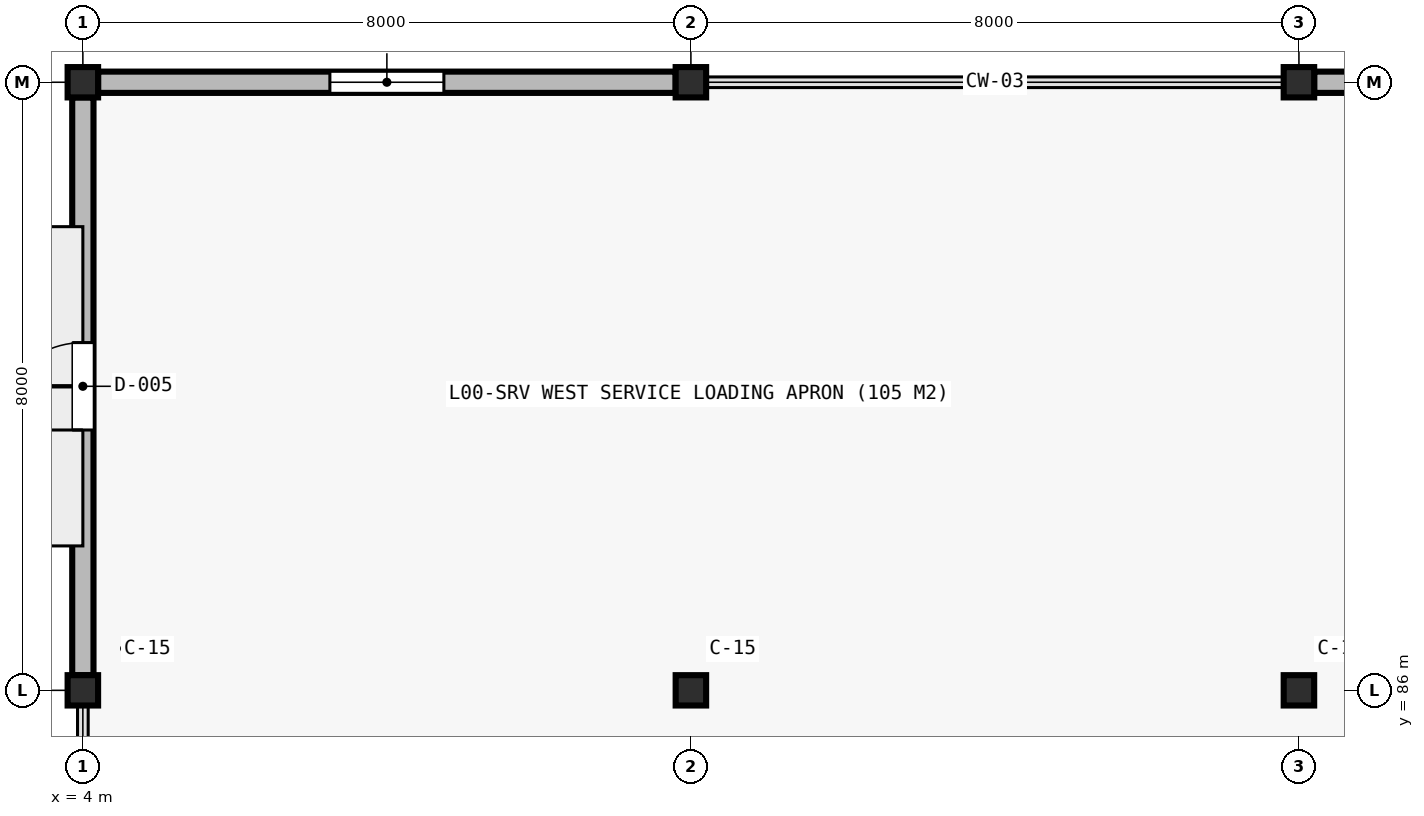
"""IFC4 building model, lengths in metres.
Left out: names, types, materials, properties, quantities, classifications, styles, units other than length and angle.
Written with IfcOpenShell. Run it as: python <this file> out.ifc"""

import sys

from ifc_helpers import new_model, si_unit, direction, frame, frame_2d, origin, origin_2d, place, context, subcontext, project, spatial, rectangle, i_section, extrude, element, fill, save


model = new_model("IFC4")
c1 = context("Model", 3, precision=1e-05, world=origin(), true_north=direction((0.0, 1.0)))
c2 = subcontext(c1, "Body", "Model", "MODEL_VIEW")
j1 = project(units=[si_unit("LENGTHUNIT", "METRE"), si_unit("PLANEANGLEUNIT", "RADIAN")], contexts=[c1])
p1 = place(None, origin())
s1 = spatial("IfcSite", under=j1, at=p1, CompositionType="ELEMENT")
p2 = place(p1, origin())
s2 = spatial("IfcBuilding", under=s1, at=p2, CompositionType="ELEMENT")
p3 = place(p2, origin())
s3 = spatial("IfcBuildingStorey", under=s2, at=p3, CompositionType="ELEMENT", Elevation=0.0)
for number, where, z_axis, x_axis in (
    (1, (4.0, 86.0, 0.0), (0.0, 0.0, 1.0), (1.0, 0.0, 0.0)),
    (2, (4.0, 94.0, 0.0), (0.0, 0.0, 1.0), (1.0, 0.0, 0.0)),
    (3, (12.0, 86.0, 0.0), (0.0, 0.0, 1.0), (1.0, 0.0, 0.0)),
    (4, (12.0, 94.0, 0.0), (0.0, 0.0, 1.0), (1.0, 0.0, 0.0)),
    (5, (20.0, 86.0, 0.0), (0.0, 0.0, 1.0), (1.0, 0.0, 0.0)),
    (6, (20.0, 94.0, 0.0), (0.0, 0.0, 1.0), (1.0, 0.0, 0.0)),
):
    element("IfcColumn", number, at=place(p3, frame(where, z_axis=z_axis, x_axis=x_axis)), inside=s3, PredefinedType="COLUMN", context=c2, shape_type="SweptSolid", body=[
        extrude(i_section(OverallWidth=0.401, OverallDepth=0.399, WebThickness=0.025, FlangeThickness=0.04, at=origin_2d()), origin(), (0.0, 0.0, 1.0), 6.02),
    ])
p4 = place(p3, frame((4.0, 86.199, 0.0), z_axis=(0.0, 0.0, 1.0), x_axis=(0.0, 1.0, 0.0)))
e7 = element("IfcWall", 7, at=p4, inside=s3, PredefinedType="STANDARD", context=c2, shape_type="SweptSolid", body=[
    extrude(rectangle(XDim=7.601, YDim=0.28, at=frame_2d((3.801, 0.0))), origin(), (0.0, 0.0, 1.0), 5.408),
])
p5 = place(p4, frame((3.226, 0.0, 0.0)))
e8 = element("IfcOpeningElement", 8, at=p5, cuts=e7, PredefinedType="OPENING", context=c2, shape_type="SweptSolid", body=[
    extrude(rectangle(XDim=1.15, YDim=2.2, at=frame_2d((0.575, 1.1))), frame((0.0, 0.15, 0.0), z_axis=(0.0, -1.0, 0.0), x_axis=(1.0, 0.0, 0.0)), (0.0, 0.0, 1.0), 0.3),
])
p6 = place(p3, frame((4.2, 94.0, 0.0), z_axis=(0.0, 0.0, 1.0), x_axis=(1.0, 0.0, 0.0)))
e9 = element("IfcWall", 9, at=p6, inside=s3, PredefinedType="STANDARD", context=c2, shape_type="SweptSolid", body=[
    extrude(rectangle(XDim=7.599, YDim=0.28, at=frame_2d((3.8, 0.0))), origin(), (0.0, 0.0, 1.0), 4.92),
])
p7 = place(p6, frame((3.05, 0.0, 0.95)))
e10 = element("IfcOpeningElement", 10, at=p7, cuts=e9, PredefinedType="OPENING", context=c2, shape_type="SweptSolid", body=[
    extrude(rectangle(XDim=1.5, YDim=2.0, at=frame_2d((0.75, 1.0))), frame((0.0, 0.15, 0.0), z_axis=(0.0, -1.0, 0.0), x_axis=(1.0, 0.0, 0.0)), (0.0, 0.0, 1.0), 0.3),
])
p8 = place(p3, frame((20.2, 94.0, 0.0), z_axis=(0.0, 0.0, 1.0), x_axis=(1.0, 0.0, 0.0)))
e11 = element("IfcWall", 11, at=p8, inside=s3, PredefinedType="STANDARD", context=c2, shape_type="SweptSolid", body=[
    extrude(rectangle(XDim=7.599, YDim=0.28, at=frame_2d((3.8, 0.0))), origin(), (0.0, 0.0, 1.0), 4.92),
])
p9 = place(p8, frame((2.774, 0.0, 0.0)))
e12 = element("IfcOpeningElement", 12, at=p9, cuts=e11, PredefinedType="OPENING", context=c2, shape_type="SweptSolid", body=[
    extrude(rectangle(XDim=2.05, YDim=2.25, at=frame_2d((1.025, 1.125))), frame((0.0, 0.15, 0.0), z_axis=(0.0, -1.0, 0.0), x_axis=(1.0, 0.0, 0.0)), (0.0, 0.0, 1.0), 0.3),
])
p10 = place(p5, origin())
e13 = element("IfcDoor", 13, at=p10, inside=s3, OperationType="SINGLE_SWING_LEFT", PredefinedType="DOOR", context=c2, shape_type="SweptSolid", body=[
    extrude(rectangle(XDim=1.15, YDim=2.2, at=frame_2d((0.575, 1.1))), frame((0.0, 0.025, 0.0), z_axis=(0.0, -1.0, 0.0), x_axis=(1.0, 0.0, 0.0)), (0.0, 0.0, 1.0), 0.05),
])
fill(e8, e13)
p11 = place(p7, origin())
e14 = element("IfcWindow", 14, at=p11, inside=s3, PartitioningType="SINGLE_PANEL", PredefinedType="WINDOW", context=c2, shape_type="SweptSolid", body=[
    extrude(rectangle(XDim=1.5, YDim=2.0, at=frame_2d((0.75, 1.0))), frame((0.0, 0.03, 0.0), z_axis=(0.0, -1.0, 0.0), x_axis=(1.0, 0.0, 0.0)), (0.0, 0.0, 1.0), 0.06),
])
fill(e10, e14)
save(model, sys.argv[1])
